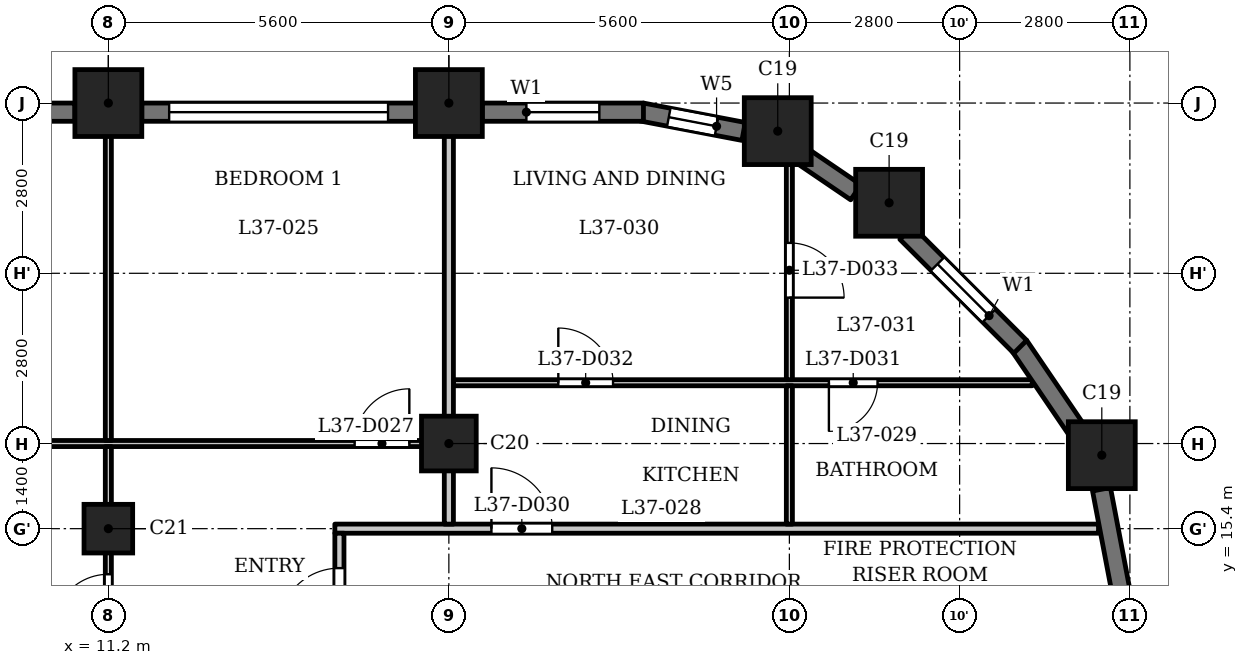
"""IFC4 building model, lengths in metres.
Left out: names, types, materials, properties, quantities, classifications, styles, units other than length and angle.
Written with IfcOpenShell. Run it as: python <this file> out.ifc"""

import sys

from ifc_helpers import new_model, si_unit, direction, frame, frame_2d, origin, origin_2d, place, context, subcontext, project, spatial, rectangle, extrude, element, fill, save


model = new_model("IFC4")
c1 = context("Model", 3, precision=1e-05, world=origin(), true_north=direction((0.0, 1.0)))
c2 = subcontext(c1, "Body", "Model", "MODEL_VIEW")
j1 = project(units=[si_unit("LENGTHUNIT", "METRE"), si_unit("PLANEANGLEUNIT", "RADIAN")], contexts=[c1])
p1 = place(None, origin())
s1 = spatial("IfcSite", under=j1, at=p1, CompositionType="ELEMENT")
p2 = place(p1, origin())
s2 = spatial("IfcBuilding", under=s1, at=p2, CompositionType="ELEMENT")
p3 = place(p2, frame((0.0, 0.0, 146.6)))
s3 = spatial("IfcBuildingStorey", under=s2, at=p3, CompositionType="ELEMENT", Elevation=146.6)
for number, where, z_axis, x_axis in (
    (1, (27.538, 16.609, 0.0), (0.0, 0.0, 1.0), (1.0, 0.0, 0.0)),
    (2, (24.04, 20.76, 0.0), (0.0, 0.0, 1.0), (1.0, 0.0, 0.0)),
    (3, (22.209, 21.938, 0.0), (0.0, 0.0, 1.0), (1.0, 0.0, 0.0)),
    (4, (16.8, 22.4, 0.0), (0.0, 0.0, 1.0), (1.0, 0.0, 0.0)),
    (5, (11.2, 22.4, 0.0), (0.0, 0.0, 1.0), (1.0, 0.0, 0.0)),
):
    element("IfcColumn", number, at=place(p3, frame(where, z_axis=z_axis, x_axis=x_axis)), inside=s3, PredefinedType="COLUMN", context=c2, shape_type="SweptSolid", body=[
        extrude(rectangle(XDim=1.1, YDim=1.1, at=origin_2d()), origin(), (0.0, 0.0, 1.0), 3.5),
    ])
p4 = place(p3, frame((16.8, 16.8, 0.0), z_axis=(0.0, 0.0, 1.0), x_axis=(1.0, 0.0, 0.0)))
e6 = element("IfcColumn", 6, at=p4, inside=s3, PredefinedType="COLUMN", context=c2, shape_type="SweptSolid", body=[
    extrude(rectangle(XDim=0.9, YDim=0.9, at=origin_2d()), origin(), (0.0, 0.0, 1.0), 3.5),
])
p5 = place(p3, frame((11.2, 15.4, 0.0), z_axis=(0.0, 0.0, 1.0), x_axis=(1.0, 0.0, 0.0)))
e7 = element("IfcColumn", 7, at=p5, inside=s3, PredefinedType="COLUMN", context=c2, shape_type="SweptSolid", body=[
    extrude(rectangle(XDim=0.8, YDim=0.8, at=origin_2d()), origin(), (0.0, 0.0, 1.0), 3.5),
])
p6 = place(p3, frame((27.853, 14.372, 0.0), z_axis=(0.0, 0.0, 1.0), x_axis=(-0.187302784601, 0.982302227871, 0.0)))
e8 = element("IfcWall", 8, at=p6, inside=s3, PredefinedType="SOLIDWALL", context=c2, shape_type="SweptSolid", body=[
    extrude(rectangle(XDim=1.706, YDim=0.3, at=frame_2d((0.853, 0.0))), origin(), (0.0, 0.0, 1.0), 2.45),
])
p7 = place(p3, frame((27.138, 17.002, 0.0), z_axis=(0.0, 0.0, 1.0), x_axis=(-0.562075160946, 0.827086158419, 0.0)))
e9 = element("IfcWall", 9, at=p7, inside=s3, PredefinedType="SOLIDWALL", context=c2, shape_type="SweptSolid", body=[
    extrude(rectangle(XDim=1.706, YDim=0.3, at=frame_2d((0.853, 0.0))), origin(), (0.0, 0.0, 1.0), 2.45),
])
p8 = place(p3, frame((26.197, 18.391, 0.0), z_axis=(0.0, 0.0, 1.0), x_axis=(-0.707060717099, 0.707152842274, 0.0)))
e10 = element("IfcWall", 10, at=p8, inside=s3, PredefinedType="SOLIDWALL", context=c2, shape_type="SweptSolid", body=[
    extrude(rectangle(XDim=2.65, YDim=0.3, at=frame_2d((1.325, 0.0))), origin(), (0.0, 0.0, 1.0), 2.45),
])
p9 = place(p8, frame((0.725, 0.0, 0.6)))
e11 = element("IfcOpeningElement", 11, at=p9, cuts=e10, PredefinedType="OPENING", context=c2, shape_type="SweptSolid", body=[
    extrude(rectangle(XDim=1.2, YDim=1.55, at=frame_2d((0.6, 0.775))), frame((0.0, 0.16, 0.0), z_axis=(0.0, -1.0, 0.0), x_axis=(1.0, 0.0, 0.0)), (0.0, 0.0, 1.0), 0.32),
])
p10 = place(p3, frame((23.492, 20.932, 0.0), z_axis=(0.0, 0.0, 1.0), x_axis=(-0.826993959827, 0.562210806023, 0.0)))
e12 = element("IfcWall", 12, at=p10, inside=s3, PredefinedType="SOLIDWALL", context=c2, shape_type="SweptSolid", body=[
    extrude(rectangle(XDim=1.077, YDim=0.3, at=frame_2d((0.539, 0.0))), origin(), (0.0, 0.0, 1.0), 3.2),
])
p11 = place(p3, frame((21.648, 21.933, 0.0), z_axis=(0.0, 0.0, 1.0), x_axis=(-0.982297206936, 0.187329114784, 0.0)))
e13 = element("IfcWall", 13, at=p11, inside=s3, PredefinedType="SOLIDWALL", context=c2, shape_type="SweptSolid", body=[
    extrude(rectangle(XDim=1.706, YDim=0.3, at=frame_2d((0.853, 0.0))), origin(), (0.0, 0.0, 1.0), 2.45),
])
p12 = place(p11, frame((0.453, 0.0, 0.6)))
e14 = element("IfcOpeningElement", 14, at=p12, cuts=e13, PredefinedType="OPENING", context=c2, shape_type="SweptSolid", body=[
    extrude(rectangle(XDim=0.8, YDim=1.55, at=frame_2d((0.4, 0.775))), frame((0.0, 0.16, 0.0), z_axis=(0.0, -1.0, 0.0), x_axis=(1.0, 0.0, 0.0)), (0.0, 0.0, 1.0), 0.32),
])
p13 = place(p3, frame((20.0, 22.25, 0.0), z_axis=(0.0, 0.0, 1.0), x_axis=(-1.0, 0.0, 0.0)))
e15 = element("IfcWall", 15, at=p13, inside=s3, PredefinedType="SOLIDWALL", context=c2, shape_type="SweptSolid", body=[
    extrude(rectangle(XDim=2.65, YDim=0.3, at=frame_2d((1.325, 0.0))), origin(), (0.0, 0.0, 1.0), 2.45),
])
p14 = place(p13, frame((0.725, 0.0, 0.6)))
e16 = element("IfcOpeningElement", 16, at=p14, cuts=e15, PredefinedType="OPENING", context=c2, shape_type="SweptSolid", body=[
    extrude(rectangle(XDim=1.2, YDim=1.55, at=frame_2d((0.6, 0.775))), frame((0.0, 0.16, 0.0), z_axis=(0.0, -1.0, 0.0), x_axis=(1.0, 0.0, 0.0)), (0.0, 0.0, 1.0), 0.32),
])
p15 = place(p3, frame((16.25, 22.25, 0.0), z_axis=(0.0, 0.0, 1.0), x_axis=(-1.0, 0.0, 0.0)))
e17 = element("IfcWall", 17, at=p15, inside=s3, PredefinedType="SOLIDWALL", context=c2, shape_type="SweptSolid", body=[
    extrude(rectangle(XDim=4.5, YDim=0.3, at=frame_2d((2.25, 0.0))), origin(), (0.0, 0.0, 1.0), 2.45),
])
p16 = place(p15, frame((0.45, 0.0, 1.2)))
e18 = element("IfcOpeningElement", 18, at=p16, cuts=e17, PredefinedType="OPENING", context=c2, shape_type="SweptSolid", body=[
    extrude(rectangle(XDim=3.6, YDim=0.95, at=frame_2d((1.8, 0.475))), frame((0.0, 0.16, 0.0), z_axis=(0.0, -1.0, 0.0), x_axis=(1.0, 0.0, 0.0)), (0.0, 0.0, 1.0), 0.32),
])
p17 = place(p3, frame((10.65, 22.25, 0.0), z_axis=(0.0, 0.0, 1.0), x_axis=(-1.0, 0.0, 0.0)))
e19 = element("IfcWall", 19, at=p17, inside=s3, PredefinedType="SOLIDWALL", context=c2, shape_type="SweptSolid", body=[
    extrude(rectangle(XDim=4.5, YDim=0.3, at=frame_2d((2.25, 0.0))), origin(), (0.0, 0.0, 1.0), 2.45),
])
p18 = place(p17, frame((0.45, 0.0, 1.2)))
e20 = element("IfcOpeningElement", 20, at=p18, cuts=e19, PredefinedType="OPENING", context=c2, shape_type="SweptSolid", body=[
    extrude(rectangle(XDim=3.6, YDim=0.95, at=frame_2d((1.8, 0.475))), frame((0.0, 0.16, 0.0), z_axis=(0.0, -1.0, 0.0), x_axis=(1.0, 0.0, 0.0)), (0.0, 0.0, 1.0), 0.32),
])
p19 = place(p3, frame((14.925, 15.4, 0.0), z_axis=(0.0, 0.0, 1.0), x_axis=(1.0, 0.0, 0.0)))
e21 = element("IfcWall", 21, at=p19, inside=s3, PredefinedType="PARTITIONING", context=c2, shape_type="SweptSolid", body=[
    extrude(rectangle(XDim=12.559, YDim=0.15, at=frame_2d((6.279, 0.0))), origin(), (0.0, 0.0, 1.0), 3.2),
])
p20 = place(p19, frame((2.575, 0.0, 0.0)))
e22 = element("IfcOpeningElement", 22, at=p20, cuts=e21, PredefinedType="OPENING", context=c2, shape_type="SweptSolid", body=[
    extrude(rectangle(XDim=1.0, YDim=2.1, at=frame_2d((0.5, 1.05))), frame((0.0, 0.085, 0.0), z_axis=(0.0, -1.0, 0.0), x_axis=(1.0, 0.0, 0.0)), (0.0, 0.0, 1.0), 0.17),
])
p21 = place(p3, frame((-16.725, 16.8, 0.0), z_axis=(0.0, 0.0, 1.0), x_axis=(1.0, 0.0, 0.0)))
e23 = element("IfcWall", 23, at=p21, inside=s3, PredefinedType="PARTITIONING", context=c2, shape_type="SweptSolid", body=[
    extrude(rectangle(XDim=33.45, YDim=0.1, at=frame_2d((16.725, 0.0))), origin(), (0.0, 0.0, 1.0), 3.2),
])
p22 = place(p21, frame((9.575, 0.0, 0.0)))
e24 = element("IfcOpeningElement", 24, at=p22, cuts=e23, PredefinedType="OPENING", context=c2, shape_type="SweptSolid", body=[
    extrude(rectangle(XDim=0.8, YDim=2.1, at=frame_2d((0.4, 1.05))), frame((0.0, 0.06, 0.0), z_axis=(0.0, -1.0, 0.0), x_axis=(1.0, 0.0, 0.0)), (0.0, 0.0, 1.0), 0.12),
])
p23 = place(p21, frame((6.125, 0.0, 0.0)))
e25 = element("IfcOpeningElement", 25, at=p23, cuts=e23, PredefinedType="OPENING", context=c2, shape_type="SweptSolid", body=[
    extrude(rectangle(XDim=0.9, YDim=2.1, at=frame_2d((0.45, 1.05))), frame((0.0, 0.06, 0.0), z_axis=(0.0, -1.0, 0.0), x_axis=(1.0, 0.0, 0.0)), (0.0, 0.0, 1.0), 0.12),
])
p24 = place(p21, frame((0.975, 0.0, 0.0)))
e26 = element("IfcOpeningElement", 26, at=p24, cuts=e23, PredefinedType="OPENING", context=c2, shape_type="SweptSolid", body=[
    extrude(rectangle(XDim=0.9, YDim=2.1, at=frame_2d((0.45, 1.05))), frame((0.0, 0.06, 0.0), z_axis=(0.0, -1.0, 0.0), x_axis=(1.0, 0.0, 0.0)), (0.0, 0.0, 1.0), 0.12),
])
p25 = place(p21, frame((3.225, 0.0, 0.0)))
e27 = element("IfcOpeningElement", 27, at=p25, cuts=e23, PredefinedType="OPENING", context=c2, shape_type="SweptSolid", body=[
    extrude(rectangle(XDim=0.9, YDim=2.1, at=frame_2d((0.45, 1.05))), frame((0.0, 0.06, 0.0), z_axis=(0.0, -1.0, 0.0), x_axis=(1.0, 0.0, 0.0)), (0.0, 0.0, 1.0), 0.12),
])
p26 = place(p21, frame((15.375, 0.0, 0.0)))
e28 = element("IfcOpeningElement", 28, at=p26, cuts=e23, PredefinedType="OPENING", context=c2, shape_type="SweptSolid", body=[
    extrude(rectangle(XDim=0.8, YDim=2.1, at=frame_2d((0.4, 1.05))), frame((0.0, 0.06, 0.0), z_axis=(0.0, -1.0, 0.0), x_axis=(1.0, 0.0, 0.0)), (0.0, 0.0, 1.0), 0.12),
])
p27 = place(p21, frame((13.175, 0.0, 0.0)))
e29 = element("IfcOpeningElement", 29, at=p27, cuts=e23, PredefinedType="OPENING", context=c2, shape_type="SweptSolid", body=[
    extrude(rectangle(XDim=0.9, YDim=2.1, at=frame_2d((0.45, 1.05))), frame((0.0, 0.06, 0.0), z_axis=(0.0, -1.0, 0.0), x_axis=(1.0, 0.0, 0.0)), (0.0, 0.0, 1.0), 0.12),
])
p28 = place(p21, frame((31.975, 0.0, 0.0)))
e30 = element("IfcOpeningElement", 30, at=p28, cuts=e23, PredefinedType="OPENING", context=c2, shape_type="SweptSolid", body=[
    extrude(rectangle(XDim=0.9, YDim=2.1, at=frame_2d((0.45, 1.05))), frame((0.0, 0.06, 0.0), z_axis=(0.0, -1.0, 0.0), x_axis=(1.0, 0.0, 0.0)), (0.0, 0.0, 1.0), 0.12),
])
p29 = place(p21, frame((22.875, 0.0, 0.0)))
e31 = element("IfcOpeningElement", 31, at=p29, cuts=e23, PredefinedType="OPENING", context=c2, shape_type="SweptSolid", body=[
    extrude(rectangle(XDim=0.9, YDim=2.1, at=frame_2d((0.45, 1.05))), frame((0.0, 0.06, 0.0), z_axis=(0.0, -1.0, 0.0), x_axis=(1.0, 0.0, 0.0)), (0.0, 0.0, 1.0), 0.12),
])
p30 = place(p3, frame((16.875, 17.8, 0.0), z_axis=(0.0, 0.0, 1.0), x_axis=(1.0, 0.0, 0.0)))
e32 = element("IfcWall", 32, at=p30, inside=s3, PredefinedType="PARTITIONING", context=c2, shape_type="SweptSolid", body=[
    extrude(rectangle(XDim=9.519, YDim=0.1, at=frame_2d((4.76, 0.0))), origin(), (0.0, 0.0, 1.0), 3.2),
])
p31 = place(p30, frame((6.175, 0.0, 0.0)))
e33 = element("IfcOpeningElement", 33, at=p31, cuts=e32, PredefinedType="OPENING", context=c2, shape_type="SweptSolid", body=[
    extrude(rectangle(XDim=0.8, YDim=2.1, at=frame_2d((0.4, 1.05))), frame((0.0, 0.06, 0.0), z_axis=(0.0, -1.0, 0.0), x_axis=(1.0, 0.0, 0.0)), (0.0, 0.0, 1.0), 0.12),
])
p32 = place(p30, frame((1.725, 0.0, 0.0)))
e34 = element("IfcOpeningElement", 34, at=p32, cuts=e32, PredefinedType="OPENING", context=c2, shape_type="SweptSolid", body=[
    extrude(rectangle(XDim=0.9, YDim=2.1, at=frame_2d((0.45, 1.05))), frame((0.0, 0.06, 0.0), z_axis=(0.0, -1.0, 0.0), x_axis=(1.0, 0.0, 0.0)), (0.0, 0.0, 1.0), 0.12),
])
p33 = place(p3, frame((11.2, 13.275, 0.0), z_axis=(0.0, 0.0, 1.0), x_axis=(0.0, 1.0, 0.0)))
e35 = element("IfcWall", 35, at=p33, inside=s3, PredefinedType="PARTITIONING", context=c2, shape_type="SweptSolid", body=[
    extrude(rectangle(XDim=3.475, YDim=0.1, at=frame_2d((1.738, 0.0))), origin(), (0.0, 0.0, 1.0), 3.2),
])
p34 = place(p33, frame((0.475, 0.0, 0.0)))
e36 = element("IfcOpeningElement", 36, at=p34, cuts=e35, PredefinedType="OPENING", context=c2, shape_type="SweptSolid", body=[
    extrude(rectangle(XDim=0.9, YDim=2.1, at=frame_2d((0.45, 1.05))), frame((0.0, 0.06, 0.0), z_axis=(0.0, -1.0, 0.0), x_axis=(1.0, 0.0, 0.0)), (0.0, 0.0, 1.0), 0.12),
])
p35 = place(p3, frame((11.2, 16.85, 0.0), z_axis=(0.0, 0.0, 1.0), x_axis=(0.0, 1.0, 0.0)))
e37 = element("IfcWall", 37, at=p35, inside=s3, PredefinedType="PARTITIONING", context=c2, shape_type="SweptSolid", body=[
    extrude(rectangle(XDim=6.08, YDim=0.1, at=frame_2d((3.04, 0.0))), origin(), (0.0, 0.0, 1.0), 3.2),
])
p36 = place(p3, frame((15.0, 13.275, 0.0), z_axis=(0.0, 0.0, 1.0), x_axis=(0.0, 1.0, 0.0)))
e38 = element("IfcWall", 38, at=p36, inside=s3, PredefinedType="PARTITIONING", context=c2, shape_type="SweptSolid", body=[
    extrude(rectangle(XDim=2.05, YDim=0.15, at=frame_2d((1.025, 0.0))), origin(), (0.0, 0.0, 1.0), 3.2),
])
p37 = place(p36, frame((0.476, 0.0, 0.0)))
e39 = element("IfcOpeningElement", 39, at=p37, cuts=e38, PredefinedType="OPENING", context=c2, shape_type="SweptSolid", body=[
    extrude(rectangle(XDim=1.0, YDim=2.1, at=frame_2d((0.5, 1.05))), frame((0.0, 0.085, 0.0), z_axis=(0.0, -1.0, 0.0), x_axis=(1.0, 0.0, 0.0)), (0.0, 0.0, 1.0), 0.17),
])
p38 = place(p3, frame((16.8, 15.475, 0.0), z_axis=(0.0, 0.0, 1.0), x_axis=(0.0, 1.0, 0.0)))
e40 = element("IfcWall", 40, at=p38, inside=s3, PredefinedType="PARTITIONING", context=c2, shape_type="SweptSolid", body=[
    extrude(rectangle(XDim=7.455, YDim=0.15, at=frame_2d((3.728, 0.0))), origin(), (0.0, 0.0, 1.0), 3.2),
])
p39 = place(p3, frame((22.4, 15.475, 0.0), z_axis=(0.0, 0.0, 1.0), x_axis=(0.0, 1.0, 0.0)))
e41 = element("IfcWall", 41, at=p39, inside=s3, PredefinedType="PARTITIONING", context=c2, shape_type="SweptSolid", body=[
    extrude(rectangle(XDim=2.275, YDim=0.1, at=frame_2d((1.137, 0.0))), origin(), (0.0, 0.0, 1.0), 3.2),
])
p40 = place(p3, frame((22.4, 17.85, 0.0), z_axis=(0.0, 0.0, 1.0), x_axis=(0.0, 1.0, 0.0)))
e42 = element("IfcWall", 42, at=p40, inside=s3, PredefinedType="PARTITIONING", context=c2, shape_type="SweptSolid", body=[
    extrude(rectangle(XDim=3.87, YDim=0.1, at=frame_2d((1.935, 0.0))), origin(), (0.0, 0.0, 1.0), 3.2),
])
p41 = place(p40, frame((1.35, 0.0, 0.0)))
e43 = element("IfcOpeningElement", 43, at=p41, cuts=e42, PredefinedType="OPENING", context=c2, shape_type="SweptSolid", body=[
    extrude(rectangle(XDim=0.9, YDim=2.1, at=frame_2d((0.45, 1.05))), frame((0.0, 0.06, 0.0), z_axis=(0.0, -1.0, 0.0), x_axis=(1.0, 0.0, 0.0)), (0.0, 0.0, 1.0), 0.12),
])
p42 = place(p37, origin())
e44 = element("IfcDoor", 44, at=p42, inside=s3, OperationType="SINGLE_SWING_RIGHT", PredefinedType="DOOR", context=c2, shape_type="SweptSolid", body=[
    extrude(rectangle(XDim=1.0, YDim=2.1, at=frame_2d((0.5, 1.05))), frame((0.0, 0.025, 0.0), z_axis=(0.0, -1.0, 0.0), x_axis=(1.0, 0.0, 0.0)), (0.0, 0.0, 1.0), 0.05),
])
fill(e39, e44)
p43 = place(p34, origin())
e45 = element("IfcDoor", 45, at=p43, inside=s3, OperationType="SINGLE_SWING_RIGHT", PredefinedType="DOOR", context=c2, shape_type="SweptSolid", body=[
    extrude(rectangle(XDim=0.9, YDim=2.1, at=frame_2d((0.45, 1.05))), frame((0.0, 0.025, 0.0), z_axis=(0.0, -1.0, 0.0), x_axis=(1.0, 0.0, 0.0)), (0.0, 0.0, 1.0), 0.05),
])
fill(e36, e45)
p44 = place(p28, origin())
e46 = element("IfcDoor", 46, at=p44, inside=s3, OperationType="SINGLE_SWING_LEFT", PredefinedType="DOOR", context=c2, shape_type="SweptSolid", body=[
    extrude(rectangle(XDim=0.9, YDim=2.1, at=frame_2d((0.45, 1.05))), frame((0.0, 0.025, 0.0), z_axis=(0.0, -1.0, 0.0), x_axis=(1.0, 0.0, 0.0)), (0.0, 0.0, 1.0), 0.05),
])
fill(e30, e46)
p45 = place(p20, origin())
e47 = element("IfcDoor", 47, at=p45, inside=s3, OperationType="SINGLE_SWING_RIGHT", PredefinedType="DOOR", context=c2, shape_type="SweptSolid", body=[
    extrude(rectangle(XDim=1.0, YDim=2.1, at=frame_2d((0.5, 1.05))), frame((0.0, 0.025, 0.0), z_axis=(0.0, -1.0, 0.0), x_axis=(1.0, 0.0, 0.0)), (0.0, 0.0, 1.0), 0.05),
])
fill(e22, e47)
p46 = place(p31, origin())
e48 = element("IfcDoor", 48, at=p46, inside=s3, OperationType="SINGLE_SWING_LEFT", PredefinedType="DOOR", context=c2, shape_type="SweptSolid", body=[
    extrude(rectangle(XDim=0.8, YDim=2.1, at=frame_2d((0.4, 1.05))), frame((0.0, 0.025, 0.0), z_axis=(0.0, -1.0, 0.0), x_axis=(1.0, 0.0, 0.0)), (0.0, 0.0, 1.0), 0.05),
])
fill(e33, e48)
p47 = place(p32, origin())
e49 = element("IfcDoor", 49, at=p47, inside=s3, OperationType="SINGLE_SWING_RIGHT", PredefinedType="DOOR", context=c2, shape_type="SweptSolid", body=[
    extrude(rectangle(XDim=0.9, YDim=2.1, at=frame_2d((0.45, 1.05))), frame((0.0, 0.025, 0.0), z_axis=(0.0, -1.0, 0.0), x_axis=(1.0, 0.0, 0.0)), (0.0, 0.0, 1.0), 0.05),
])
fill(e34, e49)
p48 = place(p41, origin())
e50 = element("IfcDoor", 50, at=p48, inside=s3, OperationType="SINGLE_SWING_LEFT", PredefinedType="DOOR", context=c2, shape_type="SweptSolid", body=[
    extrude(rectangle(XDim=0.9, YDim=2.1, at=frame_2d((0.45, 1.05))), frame((0.0, 0.025, 0.0), z_axis=(0.0, -1.0, 0.0), x_axis=(1.0, 0.0, 0.0)), (0.0, 0.0, 1.0), 0.05),
])
fill(e43, e50)
p49 = place(p9, origin())
e51 = element("IfcWindow", 51, at=p49, inside=s3, PartitioningType="SINGLE_PANEL", PredefinedType="WINDOW", context=c2, shape_type="SweptSolid", body=[
    extrude(rectangle(XDim=1.2, YDim=1.55, at=frame_2d((0.6, 0.775))), frame((0.0, 0.03, 0.0), z_axis=(0.0, -1.0, 0.0), x_axis=(1.0, 0.0, 0.0)), (0.0, 0.0, 1.0), 0.06),
])
fill(e11, e51)
p50 = place(p12, origin())
e52 = element("IfcWindow", 52, at=p50, inside=s3, PartitioningType="SINGLE_PANEL", PredefinedType="WINDOW", context=c2, shape_type="SweptSolid", body=[
    extrude(rectangle(XDim=0.8, YDim=1.55, at=frame_2d((0.4, 0.775))), frame((0.0, 0.03, 0.0), z_axis=(0.0, -1.0, 0.0), x_axis=(1.0, 0.0, 0.0)), (0.0, 0.0, 1.0), 0.06),
])
fill(e14, e52)
p51 = place(p14, origin())
e53 = element("IfcWindow", 53, at=p51, inside=s3, PartitioningType="SINGLE_PANEL", PredefinedType="WINDOW", context=c2, shape_type="SweptSolid", body=[
    extrude(rectangle(XDim=1.2, YDim=1.55, at=frame_2d((0.6, 0.775))), frame((0.0, 0.03, 0.0), z_axis=(0.0, -1.0, 0.0), x_axis=(1.0, 0.0, 0.0)), (0.0, 0.0, 1.0), 0.06),
])
fill(e16, e53)
p52 = place(p16, origin())
e54 = element("IfcWindow", 54, at=p52, inside=s3, PartitioningType="SINGLE_PANEL", PredefinedType="WINDOW", context=c2, shape_type="SweptSolid", body=[
    extrude(rectangle(XDim=3.6, YDim=0.95, at=frame_2d((1.8, 0.475))), frame((0.0, 0.03, 0.0), z_axis=(0.0, -1.0, 0.0), x_axis=(1.0, 0.0, 0.0)), (0.0, 0.0, 1.0), 0.06),
])
fill(e18, e54)
save(model, sys.argv[1])
